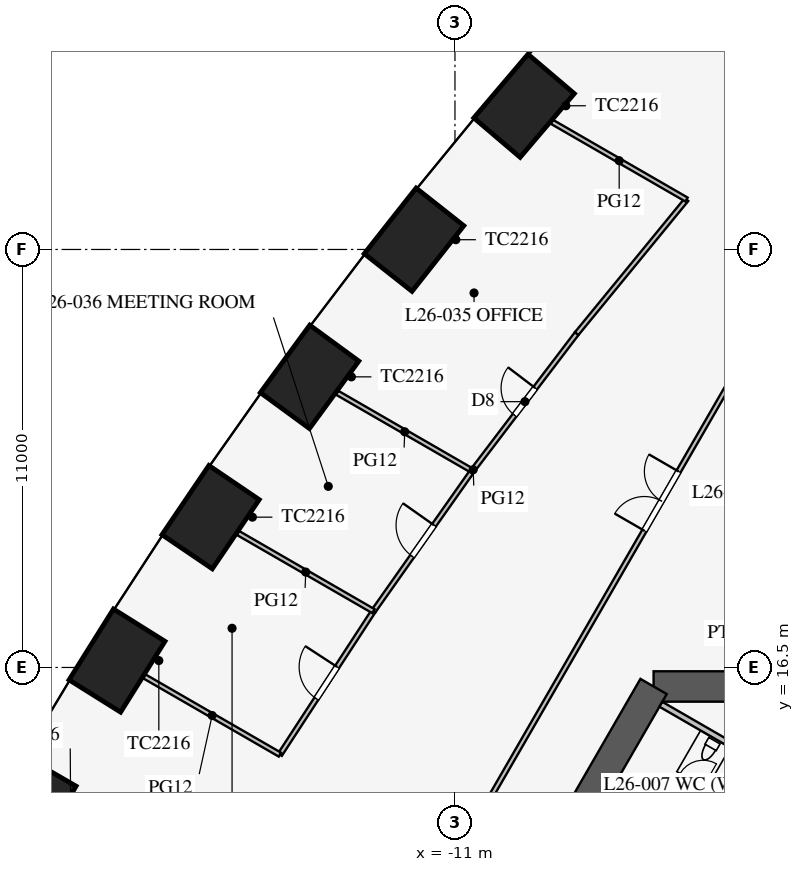
"""IFC4 building model, lengths in metres.
Left out: names, types, materials, properties, quantities, classifications, styles, units other than length and angle.
Written with IfcOpenShell. Run it as: python <this file> out.ifc"""

import sys

from ifc_helpers import new_model, si_unit, direction, frame, frame_2d, origin, origin_2d, place, context, subcontext, project, spatial, rectangle, extrude, element, fill, save


model = new_model("IFC4")
c1 = context("Model", 3, precision=1e-05, world=origin(), true_north=direction((0.0, 1.0)))
c2 = subcontext(c1, "Body", "Model", "MODEL_VIEW")
j1 = project(units=[si_unit("LENGTHUNIT", "METRE"), si_unit("PLANEANGLEUNIT", "RADIAN")], contexts=[c1])
p1 = place(None, origin())
s1 = spatial("IfcSite", under=j1, at=p1, CompositionType="ELEMENT")
p2 = place(p1, origin())
s2 = spatial("IfcBuilding", under=s1, at=p2, CompositionType="ELEMENT")
p3 = place(p2, frame((0.0, 0.0, 115.7)))
s3 = spatial("IfcBuildingStorey", under=s2, at=p3, CompositionType="ELEMENT", Elevation=115.7)
for number, where, z_axis, x_axis in (
    (1, (-9.182, 31.282, 0.0), (0.0, 0.0, 1.0), (-0.648, -0.762, 0.0)),
    (2, (-12.077, 27.757, 0.0), (0.0, 0.0, 1.0), (-0.62, -0.785, 0.0)),
    (3, (-14.825, 24.148, 0.0), (0.0, 0.0, 1.0), (-0.591, -0.807, 0.0)),
    (4, (-17.43, 20.456, 0.0), (0.0, 0.0, 1.0), (-0.561, -0.828, 0.0)),
    (5, (-19.893, 16.681, 0.0), (0.0, 0.0, 1.0), (-0.531, -0.847, 0.0)),
    (6, (-22.213, 12.825, 0.0), (0.0, 0.0, 1.0), (-0.5, -0.866, 0.0)),
):
    element("IfcColumn", number, at=place(p3, frame(where, z_axis=z_axis, x_axis=x_axis)), inside=s3, PredefinedType="COLUMN", context=c2, shape_type="SweptSolid", body=[
        extrude(rectangle(XDim=2.2, YDim=1.6, at=origin_2d()), origin(), (0.0, 0.0, 1.0), 4.2),
    ])
p4 = place(p3, frame((5.773, 16.0, 0.0), z_axis=(0.0, 0.0, 1.0), x_axis=(-1.0, 0.0, 0.0)))
e7 = element("IfcWall", 7, at=p4, inside=s3, PredefinedType="SHEAR", context=c2, shape_type="SweptSolid", body=[
    extrude(rectangle(XDim=11.547, YDim=0.8, at=frame_2d((5.773, 0.0))), origin(), (0.0, 0.0, 1.0), 4.2),
])
p5 = place(p3, frame((-5.773, 16.0, 0.0), z_axis=(0.0, 0.0, 1.0), x_axis=(-0.500002442456, -0.866023993627, 0.0)))
e8 = element("IfcWall", 8, at=p5, inside=s3, PredefinedType="SHEAR", context=c2, shape_type="SweptSolid", body=[
    extrude(rectangle(XDim=21.939, YDim=0.8, at=frame_2d((10.97, 0.0))), origin(), (0.0, 0.0, 1.0), 4.2),
])
p6 = place(p5, frame((17.27, 0.0, 0.0)))
e9 = element("IfcOpeningElement", 9, at=p6, cuts=e8, PredefinedType="OPENING", context=c2, shape_type="SweptSolid", body=[
    extrude(rectangle(XDim=1.2, YDim=2.1, at=frame_2d((0.6, 1.05))), frame((0.0, 0.41, 0.0), z_axis=(0.0, -1.0, 0.0), x_axis=(1.0, 0.0, 0.0)), (0.0, 0.0, 1.0), 0.82),
])
p7 = place(p5, frame((3.47, 0.0, 0.0)))
e10 = element("IfcOpeningElement", 10, at=p7, cuts=e8, PredefinedType="OPENING", context=c2, shape_type="SweptSolid", body=[
    extrude(rectangle(XDim=1.2, YDim=2.1, at=frame_2d((0.6, 1.05))), frame((0.0, 0.41, 0.0), z_axis=(0.0, -1.0, 0.0), x_axis=(1.0, 0.0, 0.0)), (0.0, 0.0, 1.0), 0.82),
])
p8 = place(p3, frame((-2.495, 10.678, 0.0), z_axis=(0.0, 0.0, 1.0), x_axis=(-0.86602216432, 0.500005610874, 0.0)))
e11 = element("IfcWall", 11, at=p8, inside=s3, PredefinedType="PARTITIONING", context=c2, shape_type="SweptSolid", body=[
    extrude(rectangle(XDim=5.1, YDim=0.15, at=frame_2d((2.55, 0.0))), origin(), (0.0, 0.0, 1.0), 4.0),
])
p9 = place(p8, frame((2.6, 0.0, 0.0)))
e12 = element("IfcOpeningElement", 12, at=p9, cuts=e11, PredefinedType="OPENING", context=c2, shape_type="SweptSolid", body=[
    extrude(rectangle(XDim=0.9, YDim=2.1, at=frame_2d((0.45, 1.05))), frame((0.0, 0.085, 0.0), z_axis=(0.0, -1.0, 0.0), x_axis=(1.0, 0.0, 0.0)), (0.0, 0.0, 1.0), 0.17),
])
p10 = place(p3, frame((-2.031, 13.482, 0.0), z_axis=(0.0, 0.0, 1.0), x_axis=(-0.866050731258, 0.499956128963, 0.0)))
e13 = element("IfcWall", 13, at=p10, inside=s3, PredefinedType="PARTITIONING", context=c2, shape_type="SweptSolid", body=[
    extrude(rectangle(XDim=4.1, YDim=0.15, at=frame_2d((2.05, 0.0))), origin(), (0.0, 0.0, 1.0), 4.0),
])
p11 = place(p3, frame((-0.016, 30.491, 0.0), z_axis=(0.0, 0.0, 1.0), x_axis=(-0.50000091641, -0.866024874695, 0.0)))
e14 = element("IfcWall", 14, at=p11, inside=s3, PredefinedType="PARTITIONING", context=c2, shape_type="SweptSolid", body=[
    extrude(rectangle(XDim=52.796, YDim=0.12, at=frame_2d((26.398, 0.0))), origin(), (0.0, 0.0, 1.0), 2.9),
])
p12 = place(p11, frame((10.2, 0.0, 0.15)))
e15 = element("IfcOpeningElement", 15, at=p12, cuts=e14, PredefinedType="OPENING", context=c2, shape_type="SweptSolid", body=[
    extrude(rectangle(XDim=1.8, YDim=2.1, at=frame_2d((0.9, 1.05))), frame((0.0, 0.07, 0.0), z_axis=(0.0, -1.0, 0.0), x_axis=(1.0, 0.0, 0.0)), (0.0, 0.0, 1.0), 0.14),
])
p13 = place(p11, frame((40.8, 0.0, 0.15)))
e16 = element("IfcOpeningElement", 16, at=p13, cuts=e14, PredefinedType="OPENING", context=c2, shape_type="SweptSolid", body=[
    extrude(rectangle(XDim=1.8, YDim=2.1, at=frame_2d((0.9, 1.05))), frame((0.0, 0.07, 0.0), z_axis=(0.0, -1.0, 0.0), x_axis=(1.0, 0.0, 0.0)), (0.0, 0.0, 1.0), 0.14),
])
p14 = place(p3, frame((-10.543, 21.675, 0.0), z_axis=(0.0, 0.0, 1.0), x_axis=(-0.575987178736, -0.817458726745, 0.0)))
e17 = element("IfcWall", 17, at=p14, inside=s3, PredefinedType="PARTITIONING", context=c2, shape_type="SweptSolid", body=[
    extrude(rectangle(XDim=4.518, YDim=0.12, at=frame_2d((2.259, 0.0))), origin(), (0.0, 0.0, 1.0), 2.9),
])
p15 = place(p14, frame((1.75, 0.0, 0.15)))
e18 = element("IfcOpeningElement", 18, at=p15, cuts=e17, PredefinedType="OPENING", context=c2, shape_type="SweptSolid", body=[
    extrude(rectangle(XDim=1.0, YDim=2.1, at=frame_2d((0.5, 1.05))), frame((0.0, 0.07, 0.0), z_axis=(0.0, -1.0, 0.0), x_axis=(1.0, 0.0, 0.0)), (0.0, 0.0, 1.0), 0.14),
])
p16 = place(p3, frame((-7.797, 25.286, 0.0), z_axis=(0.0, 0.0, 1.0), x_axis=(-0.605274299339, -0.796016973789, 0.0)))
e19 = element("IfcWall", 19, at=p16, inside=s3, PredefinedType="PARTITIONING", context=c2, shape_type="SweptSolid", body=[
    extrude(rectangle(XDim=4.536, YDim=0.12, at=frame_2d((2.268, 0.0))), origin(), (0.0, 0.0, 1.0), 2.9),
])
p17 = place(p16, frame((1.8, 0.0, 0.15)))
e20 = element("IfcOpeningElement", 20, at=p17, cuts=e19, PredefinedType="OPENING", context=c2, shape_type="SweptSolid", body=[
    extrude(rectangle(XDim=0.9, YDim=2.1, at=frame_2d((0.45, 1.05))), frame((0.0, 0.07, 0.0), z_axis=(0.0, -1.0, 0.0), x_axis=(1.0, 0.0, 0.0)), (0.0, 0.0, 1.0), 0.14),
])
p18 = place(p3, frame((-4.906, 28.813, 0.0), z_axis=(0.0, 0.0, 1.0), x_axis=(-0.633843962561, -0.773460943503, 0.0)))
e21 = element("IfcWall", 21, at=p18, inside=s3, PredefinedType="PARTITIONING", context=c2, shape_type="SweptSolid", body=[
    extrude(rectangle(XDim=4.561, YDim=0.12, at=frame_2d((2.28, 0.0))), origin(), (0.0, 0.0, 1.0), 2.9),
])
p19 = place(p3, frame((-13.145, 17.982, 0.0), z_axis=(0.0, 0.0, 1.0), x_axis=(-0.546069464151, -0.837739900161, 0.0)))
e22 = element("IfcWall", 22, at=p19, inside=s3, PredefinedType="PARTITIONING", context=c2, shape_type="SweptSolid", body=[
    extrude(rectangle(XDim=4.507, YDim=0.12, at=frame_2d((2.253, 0.0))), origin(), (0.0, 0.0, 1.0), 2.9),
])
p20 = place(p19, frame((1.75, 0.0, 0.15)))
e23 = element("IfcOpeningElement", 23, at=p20, cuts=e22, PredefinedType="OPENING", context=c2, shape_type="SweptSolid", body=[
    extrude(rectangle(XDim=1.0, YDim=2.1, at=frame_2d((0.5, 1.05))), frame((0.0, 0.07, 0.0), z_axis=(0.0, -1.0, 0.0), x_axis=(1.0, 0.0, 0.0)), (0.0, 0.0, 1.0), 0.14),
])
p21 = place(p3, frame((-10.543, 21.675, 0.0), z_axis=(0.0, 0.0, 1.0), x_axis=(-0.866019409031, 0.500010383074, 0.0)))
e24 = element("IfcWall", 24, at=p21, inside=s3, PredefinedType="PARTITIONING", context=c2, shape_type="SweptSolid", body=[
    extrude(rectangle(XDim=4.11, YDim=0.12, at=frame_2d((2.055, 0.0))), origin(), (0.0, 0.0, 1.0), 2.9),
])
p22 = place(p3, frame((-4.906, 28.813, 0.0), z_axis=(0.0, 0.0, 1.0), x_axis=(-0.86601374377, 0.500020195194, 0.0)))
e25 = element("IfcWall", 25, at=p22, inside=s3, PredefinedType="PARTITIONING", context=c2, shape_type="SweptSolid", body=[
    extrude(rectangle(XDim=4.093, YDim=0.12, at=frame_2d((2.046, 0.0))), origin(), (0.0, 0.0, 1.0), 2.9),
])
p23 = place(p3, frame((-15.606, 14.206, 0.0), z_axis=(0.0, 0.0, 1.0), x_axis=(-0.866016800201, 0.500014901547, 0.0)))
e26 = element("IfcWall", 26, at=p23, inside=s3, PredefinedType="PARTITIONING", context=c2, shape_type="SweptSolid", body=[
    extrude(rectangle(XDim=4.119, YDim=0.12, at=frame_2d((2.06, 0.0))), origin(), (0.0, 0.0, 1.0), 2.9),
])
p24 = place(p3, frame((-13.145, 17.982, 0.0), z_axis=(0.0, 0.0, 1.0), x_axis=(-0.866018637367, 0.500011719595, 0.0)))
e27 = element("IfcWall", 27, at=p24, inside=s3, PredefinedType="PARTITIONING", context=c2, shape_type="SweptSolid", body=[
    extrude(rectangle(XDim=4.116, YDim=0.12, at=frame_2d((2.058, 0.0))), origin(), (0.0, 0.0, 1.0), 2.9),
])
p25 = place(p17, frame((0.9, 0.0, 0.0), z_axis=(0.0, 0.0, 1.0), x_axis=(-1.0, 0.0, 0.0)))
e28 = element("IfcDoor", 28, at=p25, inside=s3, OperationType="SINGLE_SWING_RIGHT", PredefinedType="DOOR", context=c2, shape_type="SweptSolid", body=[
    extrude(rectangle(XDim=0.9, YDim=2.1, at=frame_2d((0.45, 1.05))), frame((0.0, 0.025, 0.0), z_axis=(0.0, -1.0, 0.0), x_axis=(1.0, 0.0, 0.0)), (0.0, 0.0, 1.0), 0.05),
])
fill(e20, e28)
p26 = place(p15, frame((1.0, 0.0, 0.0), z_axis=(0.0, 0.0, 1.0), x_axis=(-1.0, 0.0, 0.0)))
e29 = element("IfcDoor", 29, at=p26, inside=s3, OperationType="SINGLE_SWING_RIGHT", PredefinedType="DOOR", context=c2, shape_type="SweptSolid", body=[
    extrude(rectangle(XDim=1.0, YDim=2.1, at=frame_2d((0.5, 1.05))), frame((0.0, 0.025, 0.0), z_axis=(0.0, -1.0, 0.0), x_axis=(1.0, 0.0, 0.0)), (0.0, 0.0, 1.0), 0.05),
])
fill(e18, e29)
p27 = place(p20, frame((1.0, 0.0, 0.0), z_axis=(0.0, 0.0, 1.0), x_axis=(-1.0, 0.0, 0.0)))
e30 = element("IfcDoor", 30, at=p27, inside=s3, OperationType="SINGLE_SWING_RIGHT", PredefinedType="DOOR", context=c2, shape_type="SweptSolid", body=[
    extrude(rectangle(XDim=1.0, YDim=2.1, at=frame_2d((0.5, 1.05))), frame((0.0, 0.025, 0.0), z_axis=(0.0, -1.0, 0.0), x_axis=(1.0, 0.0, 0.0)), (0.0, 0.0, 1.0), 0.05),
])
fill(e23, e30)
p28 = place(p12, frame((1.8, 0.0, 0.0), z_axis=(0.0, 0.0, 1.0), x_axis=(-1.0, 0.0, 0.0)))
e31 = element("IfcDoor", 31, at=p28, inside=s3, OperationType="DOUBLE_DOOR_SINGLE_SWING", PredefinedType="DOOR", context=c2, shape_type="SweptSolid", body=[
    extrude(rectangle(XDim=1.8, YDim=2.1, at=frame_2d((0.9, 1.05))), frame((0.0, 0.025, 0.0), z_axis=(0.0, -1.0, 0.0), x_axis=(1.0, 0.0, 0.0)), (0.0, 0.0, 1.0), 0.05),
])
fill(e15, e31)
save(model, sys.argv[1])
